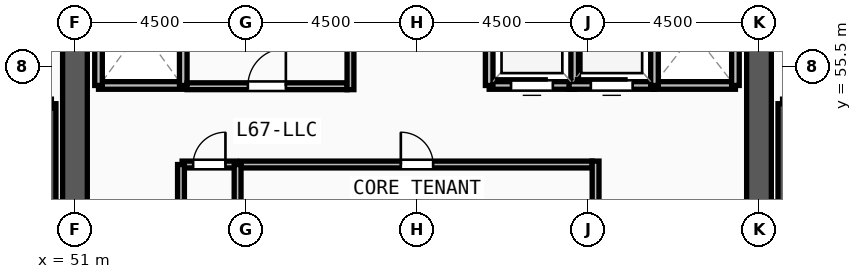
"""IFC4 building model, lengths in metres.
Left out: names, types, materials, properties, quantities, classifications, styles, units other than length and angle.
Written with IfcOpenShell. Run it as: python <this file> out.ifc"""

import sys

from ifc_helpers import new_model, si_unit, direction, frame, frame_2d, origin, place, context, subcontext, project, spatial, rectangle, extrude, source, transform, mapped, element, fill, save


model = new_model("IFC4")
c1 = context("Model", 3, precision=1e-05, world=origin(), true_north=direction((0.0, 1.0)))
c2 = subcontext(c1, "Body", "Model", "MODEL_VIEW")
j1 = project(units=[si_unit("LENGTHUNIT", "METRE"), si_unit("PLANEANGLEUNIT", "RADIAN")], contexts=[c1])
p1 = place(None, origin())
s1 = spatial("IfcSite", under=j1, at=p1, CompositionType="ELEMENT")
p2 = place(p1, origin())
s2 = spatial("IfcBuilding", under=s1, at=p2, CompositionType="ELEMENT")
p3 = place(p2, frame((0.0, 0.0, 258.75)))
s3 = spatial("IfcBuildingStorey", under=s2, at=p3, CompositionType="ELEMENT", Elevation=258.75)
p4 = place(p3, frame((69.0, 60.825, 0.0), z_axis=(0.0, 0.0, 1.0), x_axis=(0.0, -1.0, 0.0)))
e1 = element("IfcWall", 1, at=p4, inside=s3, PredefinedType="SHEAR", context=c2, shape_type="SweptSolid", body=[
    extrude(rectangle(XDim=13.65, YDim=0.65, at=frame_2d((6.825, 0.0))), origin(), (0.0, 0.0, 1.0), 3.57),
])
m1 = source(origin(), c2, "Body", "SweptSolid", [
    extrude(rectangle(XDim=1.2, YDim=2.2, at=frame_2d((0.6, 1.1))), frame((0.0, 0.335, 0.0), z_axis=(0.0, -1.0, 0.0), x_axis=(1.0, 0.0, 0.0)), (0.0, 0.0, 1.0), 0.67),
])
p5 = place(p4, frame((1.275, 0.0, 0.0)))
e2 = element("IfcOpeningElement", 2, at=p5, cuts=e1, PredefinedType="OPENING", context=c2, shape_type="MappedRepresentation", body=[
    mapped(m1, transform((0.0, 0.0, 0.0), x_axis=(1.0, 0.0, 0.0), y_axis=(0.0, 1.0, 0.0), z_axis=(0.0, 0.0, 1.0), scale=1.0)),
])
p6 = place(p3, frame((51.0, 47.175, 0.0), z_axis=(0.0, 0.0, 1.0), x_axis=(0.0, 1.0, 0.0)))
e3 = element("IfcWall", 3, at=p6, inside=s3, PredefinedType="SHEAR", context=c2, shape_type="SweptSolid", body=[
    extrude(rectangle(XDim=13.65, YDim=0.65, at=frame_2d((6.825, 0.0))), origin(), (0.0, 0.0, 1.0), 3.57),
])
for number, where, z_axis, x_axis in (
    (4, (50.38, 46.7, 0.0), (0.0, 0.0, 1.0), (0.0, 1.0, 0.0)),
    (5, (69.62, 54.52, 0.0), (0.0, 0.0, 1.0), (0.0, -1.0, 0.0)),
):
    element("IfcWall", number, at=place(p3, frame(where, z_axis=z_axis, x_axis=x_axis)), inside=s3, PredefinedType="SOLIDWALL", context=c2, shape_type="SweptSolid", body=[
        extrude(rectangle(XDim=7.82, YDim=0.24, at=frame_2d((3.91, 0.0))), origin(), (0.0, 0.0, 1.0), 3.57),
    ])
p7 = place(p3, frame((51.62, 55.0, 0.0), z_axis=(0.0, 0.0, 1.0), x_axis=(1.0, 0.0, 0.0)))
e6 = element("IfcWall", 6, at=p7, inside=s3, PredefinedType="SOLIDWALL", context=c2, shape_type="SweptSolid", body=[
    extrude(rectangle(XDim=2.23, YDim=0.2, at=frame_2d((1.115, 0.0))), origin(), (0.0, 0.0, 1.0), 3.57),
])
for number, where, z_axis, x_axis in (
    (7, (53.85, 55.0, 0.0), (0.0, 0.0, 1.0), (0.0, 1.0, 0.0)),
    (8, (51.62, 58.0, 0.0), (0.0, 0.0, 1.0), (0.0, -1.0, 0.0)),
):
    element("IfcWall", number, at=place(p3, frame(where, z_axis=z_axis, x_axis=x_axis)), inside=s3, PredefinedType="SOLIDWALL", context=c2, shape_type="SweptSolid", body=[
        extrude(rectangle(XDim=3.0, YDim=0.2, at=frame_2d((1.5, 0.0))), origin(), (0.0, 0.0, 1.0), 3.57),
    ])
p8 = place(p3, frame((66.2, 55.0, 0.0), z_axis=(0.0, 0.0, 1.0), x_axis=(1.0, 0.0, 0.0)))
e9 = element("IfcWall", 9, at=p8, inside=s3, PredefinedType="SOLIDWALL", context=c2, shape_type="SweptSolid", body=[
    extrude(rectangle(XDim=2.18, YDim=0.2, at=frame_2d((1.09, 0.0))), origin(), (0.0, 0.0, 1.0), 3.57),
])
p9 = place(p3, frame((68.38, 55.0, 0.0), z_axis=(0.0, 0.0, 1.0), x_axis=(0.0, 1.0, 0.0)))
e10 = element("IfcWall", 10, at=p9, inside=s3, PredefinedType="SOLIDWALL", context=c2, shape_type="SweptSolid", body=[
    extrude(rectangle(XDim=2.75, YDim=0.2, at=frame_2d((1.375, 0.0))), origin(), (0.0, 0.0, 1.0), 3.57),
])
p10 = place(p3, frame((61.9, 55.0, 0.0), z_axis=(0.0, 0.0, 1.0), x_axis=(1.0, 0.0, 0.0)))
e11 = element("IfcWall", 11, at=p10, inside=s3, PredefinedType="SOLIDWALL", context=c2, shape_type="SweptSolid", body=[
    extrude(rectangle(XDim=2.25, YDim=0.2, at=frame_2d((1.125, 0.0))), origin(), (0.0, 0.0, 1.0), 3.57),
])
m2 = source(origin(), c2, "Body", "SweptSolid", [
    extrude(rectangle(XDim=1.1, YDim=2.2, at=frame_2d((0.55, 1.1))), frame((0.0, 0.11, 0.0), z_axis=(0.0, -1.0, 0.0), x_axis=(1.0, 0.0, 0.0)), (0.0, 0.0, 1.0), 0.22),
])
p11 = place(p10, frame((0.575, 0.0, 0.0)))
e12 = element("IfcOpeningElement", 12, at=p11, cuts=e11, PredefinedType="OPENING", context=c2, shape_type="MappedRepresentation", body=[
    mapped(m2, transform((0.0, 0.0, 0.0), x_axis=(1.0, 0.0, 0.0), y_axis=(0.0, 1.0, 0.0), z_axis=(0.0, 0.0, 1.0), scale=1.0)),
])
for number, where, z_axis, x_axis in (
    (13, (64.15, 55.0, 0.0), (0.0, 0.0, 1.0), (0.0, 1.0, 0.0)),
    (14, (61.9, 57.6, 0.0), (0.0, 0.0, 1.0), (0.0, -1.0, 0.0)),
):
    element("IfcWall", number, at=place(p3, frame(where, z_axis=z_axis, x_axis=x_axis)), inside=s3, PredefinedType="SOLIDWALL", context=c2, shape_type="SweptSolid", body=[
        extrude(rectangle(XDim=2.6, YDim=0.2, at=frame_2d((1.3, 0.0))), origin(), (0.0, 0.0, 1.0), 3.57),
    ])
p12 = place(p3, frame((64.0, 55.0, 0.0), z_axis=(0.0, 0.0, 1.0), x_axis=(1.0, 0.0, 0.0)))
e15 = element("IfcWall", 15, at=p12, inside=s3, PredefinedType="SOLIDWALL", context=c2, shape_type="SweptSolid", body=[
    extrude(rectangle(XDim=2.25, YDim=0.2, at=frame_2d((1.125, 0.0))), origin(), (0.0, 0.0, 1.0), 3.57),
])
p13 = place(p12, frame((0.575, 0.0, 0.0)))
e16 = element("IfcOpeningElement", 16, at=p13, cuts=e15, PredefinedType="OPENING", context=c2, shape_type="MappedRepresentation", body=[
    mapped(m2, transform((0.0, 0.0, 0.0), x_axis=(1.0, 0.0, 0.0), y_axis=(0.0, 1.0, 0.0), z_axis=(0.0, 0.0, 1.0), scale=1.0)),
])
p14 = place(p3, frame((66.25, 55.0, 0.0), z_axis=(0.0, 0.0, 1.0), x_axis=(0.0, 1.0, 0.0)))
e17 = element("IfcWall", 17, at=p14, inside=s3, PredefinedType="SOLIDWALL", context=c2, shape_type="SweptSolid", body=[
    extrude(rectangle(XDim=2.6, YDim=0.2, at=frame_2d((1.3, 0.0))), origin(), (0.0, 0.0, 1.0), 3.57),
])
p15 = place(p3, frame((55.37, 52.92, 0.0), z_axis=(0.0, 0.0, 1.0), x_axis=(1.0, 0.0, 0.0)))
e18 = element("IfcWall", 18, at=p15, inside=s3, PredefinedType="PARTITIONING", context=c2, shape_type="SweptSolid", body=[
    extrude(rectangle(XDim=9.24, YDim=0.18, at=frame_2d((4.62, 0.0))), origin(), (0.0, 0.0, 1.0), 3.57),
])
m3 = source(origin(), c2, "Body", "SweptSolid", [
    extrude(rectangle(XDim=0.85, YDim=2.1, at=frame_2d((0.425, 1.05))), frame((0.0, 0.1, 0.0), z_axis=(0.0, -1.0, 0.0), x_axis=(1.0, 0.0, 0.0)), (0.0, 0.0, 1.0), 0.2),
])
p16 = place(p15, frame((4.205, 0.0, 0.0)))
e19 = element("IfcOpeningElement", 19, at=p16, cuts=e18, PredefinedType="OPENING", context=c2, shape_type="MappedRepresentation", body=[
    mapped(m3, transform((0.0, 0.0, 0.0), x_axis=(1.0, 0.0, 0.0), y_axis=(0.0, 1.0, 0.0), z_axis=(0.0, 0.0, 1.0), scale=1.0)),
])
p17 = place(p3, frame((53.95, 54.98, 0.0), z_axis=(0.0, 0.0, 1.0), x_axis=(1.0, 0.0, 0.0)))
e20 = element("IfcWall", 20, at=p17, inside=s3, PredefinedType="PARTITIONING", context=c2, shape_type="SweptSolid", body=[
    extrude(rectangle(XDim=4.21, YDim=0.18, at=frame_2d((2.105, 0.0))), origin(), (0.0, 0.0, 1.0), 3.57),
])
m4 = source(origin(), c2, "Body", "SweptSolid", [
    extrude(rectangle(XDim=1.0, YDim=2.2, at=frame_2d((0.5, 1.1))), frame((0.0, 0.1, 0.0), z_axis=(0.0, -1.0, 0.0), x_axis=(1.0, 0.0, 0.0)), (0.0, 0.0, 1.0), 0.2),
])
p18 = place(p17, frame((1.6, 0.0, 0.0)))
e21 = element("IfcOpeningElement", 21, at=p18, cuts=e20, PredefinedType="OPENING", context=c2, shape_type="MappedRepresentation", body=[
    mapped(m4, transform((0.0, 0.0, 0.0), x_axis=(1.0, 0.0, 0.0), y_axis=(0.0, 1.0, 0.0), z_axis=(0.0, 0.0, 1.0), scale=1.0)),
])
p19 = place(p3, frame((53.82, 52.92, 0.0), z_axis=(0.0, 0.0, 1.0), x_axis=(1.0, 0.0, 0.0)))
e22 = element("IfcWall", 22, at=p19, inside=s3, PredefinedType="PARTITIONING", context=c2, shape_type="SweptSolid", body=[
    extrude(rectangle(XDim=1.43, YDim=0.18, at=frame_2d((0.715, 0.0))), origin(), (0.0, 0.0, 1.0), 3.57),
])
p20 = place(p19, frame((0.29, 0.0, 0.0)))
e23 = element("IfcOpeningElement", 23, at=p20, cuts=e22, PredefinedType="OPENING", context=c2, shape_type="MappedRepresentation", body=[
    mapped(m3, transform((0.0, 0.0, 0.0), x_axis=(1.0, 0.0, 0.0), y_axis=(0.0, 1.0, 0.0), z_axis=(0.0, 0.0, 1.0), scale=1.0)),
])
for number, where, z_axis, x_axis in (
    (24, (53.79, 50.35, 0.0), (0.0, 0.0, 1.0), (0.0, 1.0, 0.0)),
    (25, (55.28, 50.35, 0.0), (0.0, 0.0, 1.0), (0.0, 1.0, 0.0)),
):
    element("IfcWall", number, at=place(p3, frame(where, z_axis=z_axis, x_axis=x_axis)), inside=s3, PredefinedType="PARTITIONING", context=c2, shape_type="SweptSolid", body=[
        extrude(rectangle(XDim=2.57, YDim=0.18, at=frame_2d((1.285, 0.0))), origin(), (0.0, 0.0, 1.0), 3.57),
    ])
p21 = place(p3, frame((64.7, 50.22, 0.0), z_axis=(0.0, 0.0, 1.0), x_axis=(0.0, 1.0, 0.0)))
e26 = element("IfcWall", 26, at=p21, inside=s3, PredefinedType="PARTITIONING", context=c2, shape_type="SweptSolid", body=[
    extrude(rectangle(XDim=2.79, YDim=0.18, at=frame_2d((1.395, 0.0))), origin(), (0.0, 0.0, 1.0), 3.57),
])
p22 = place(p3, frame((58.25, 54.89, 0.0), z_axis=(0.0, 0.0, 1.0), x_axis=(0.0, 1.0, 0.0)))
e27 = element("IfcWall", 27, at=p22, inside=s3, PredefinedType="PARTITIONING", context=c2, shape_type="SweptSolid", body=[
    extrude(rectangle(XDim=2.78, YDim=0.18, at=frame_2d((1.39, 0.0))), origin(), (0.0, 0.0, 1.0), 3.57),
])
m5 = source(origin(), c2, "Body", "SweptSolid", [
    extrude(rectangle(XDim=1.1, YDim=2.2, at=frame_2d((0.55, 1.1))), frame((0.0, 0.025, 0.0), z_axis=(0.0, -1.0, 0.0), x_axis=(1.0, 0.0, 0.0)), (0.0, 0.0, 1.0), 0.05),
])
p23 = place(p11, origin())
e28 = element("IfcDoor", 28, at=p23, inside=s3, OperationType="SLIDING_TO_LEFT", PredefinedType="DOOR", context=c2, shape_type="MappedRepresentation", body=[
    mapped(m5, transform((0.0, 0.0, 0.0), x_axis=(1.0, 0.0, 0.0), y_axis=(0.0, 1.0, 0.0), z_axis=(0.0, 0.0, 1.0), scale=1.0)),
])
fill(e12, e28)
p24 = place(p13, origin())
e29 = element("IfcDoor", 29, at=p24, inside=s3, OperationType="SLIDING_TO_LEFT", PredefinedType="DOOR", context=c2, shape_type="MappedRepresentation", body=[
    mapped(m5, transform((0.0, 0.0, 0.0), x_axis=(1.0, 0.0, 0.0), y_axis=(0.0, 1.0, 0.0), z_axis=(0.0, 0.0, 1.0), scale=1.0)),
])
fill(e16, e29)
m6 = source(origin(), c2, "Body", "SweptSolid", [
    extrude(rectangle(XDim=0.85, YDim=2.1, at=frame_2d((0.425, 1.05))), frame((0.0, 0.025, 0.0), z_axis=(0.0, -1.0, 0.0), x_axis=(1.0, 0.0, 0.0)), (0.0, 0.0, 1.0), 0.05),
])
p25 = place(p16, origin())
e30 = element("IfcDoor", 30, at=p25, inside=s3, OperationType="SINGLE_SWING_LEFT", PredefinedType="DOOR", context=c2, shape_type="MappedRepresentation", body=[
    mapped(m6, transform((0.0, 0.0, 0.0), x_axis=(1.0, 0.0, 0.0), y_axis=(0.0, 1.0, 0.0), z_axis=(0.0, 0.0, 1.0), scale=1.0)),
])
fill(e19, e30)
m7 = source(origin(), c2, "Body", "SweptSolid", [
    extrude(rectangle(XDim=1.0, YDim=2.2, at=frame_2d((0.5, 1.1))), frame((0.0, 0.025, 0.0), z_axis=(0.0, -1.0, 0.0), x_axis=(1.0, 0.0, 0.0)), (0.0, 0.0, 1.0), 0.05),
])
p26 = place(p18, origin())
e31 = element("IfcDoor", 31, at=p26, inside=s3, OperationType="SINGLE_SWING_RIGHT", PredefinedType="DOOR", context=c2, shape_type="MappedRepresentation", body=[
    mapped(m7, transform((0.0, 0.0, 0.0), x_axis=(1.0, 0.0, 0.0), y_axis=(0.0, 1.0, 0.0), z_axis=(0.0, 0.0, 1.0), scale=1.0)),
])
fill(e21, e31)
p27 = place(p20, origin())
e32 = element("IfcDoor", 32, at=p27, inside=s3, OperationType="SINGLE_SWING_RIGHT", PredefinedType="DOOR", context=c2, shape_type="MappedRepresentation", body=[
    mapped(m6, transform((0.0, 0.0, 0.0), x_axis=(1.0, 0.0, 0.0), y_axis=(0.0, 1.0, 0.0), z_axis=(0.0, 0.0, 1.0), scale=1.0)),
])
fill(e23, e32)
save(model, sys.argv[1])
